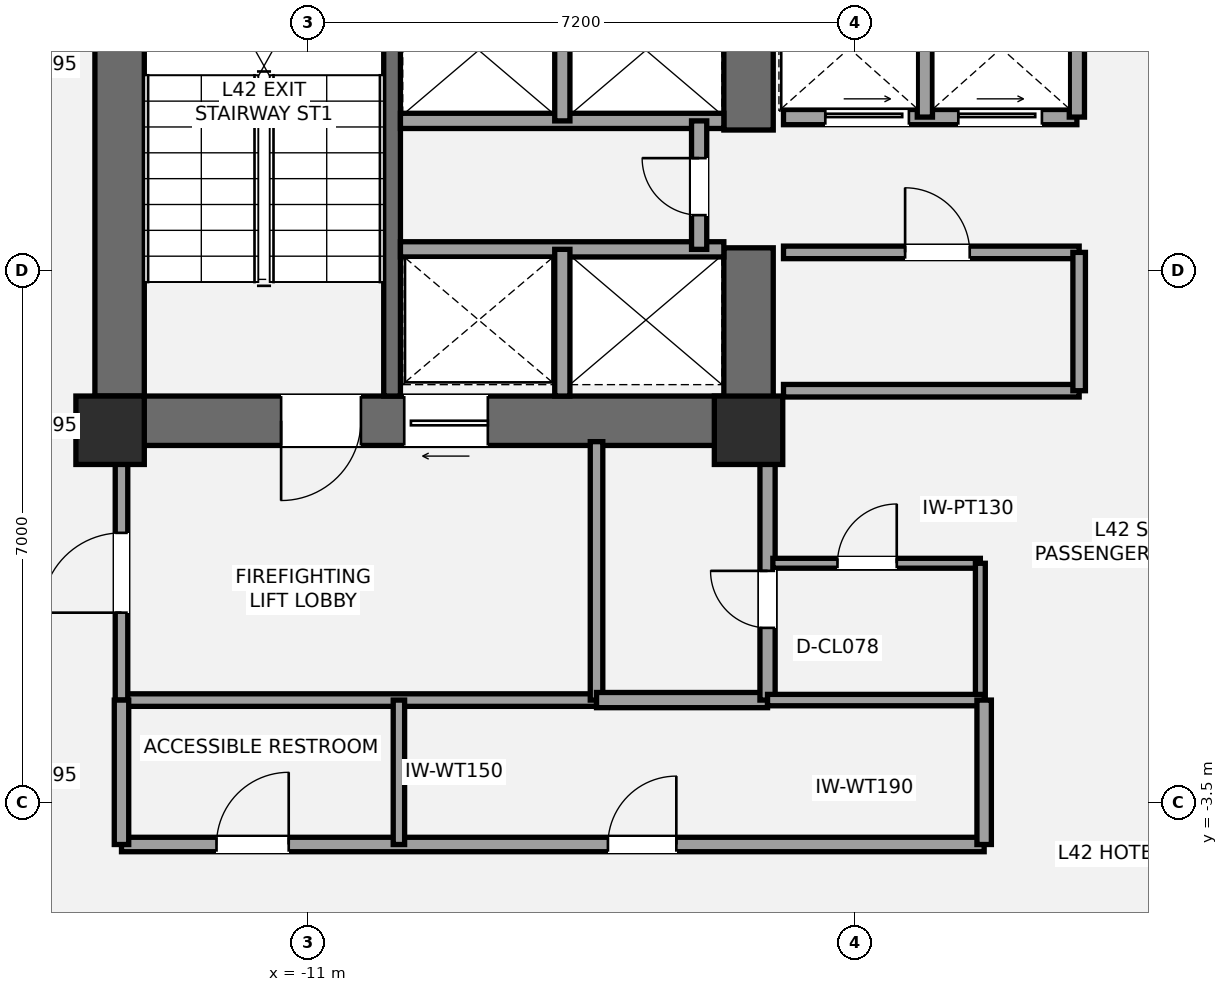
"""IFC4 building model, lengths in metres.
Left out: names, types, materials, properties, quantities, classifications, styles, units other than length and angle.
Written with IfcOpenShell. Run it as: python <this file> out.ifc"""

import sys

from ifc_helpers import new_model, si_unit, direction, frame, frame_2d, origin, origin_2d, place, context, subcontext, project, spatial, rectangle, extrude, element, fill, save


model = new_model("IFC4")
c1 = context("Model", 3, precision=1e-05, world=origin(), true_north=direction((0.0, 1.0)))
c2 = subcontext(c1, "Body", "Model", "MODEL_VIEW")
j1 = project(units=[si_unit("LENGTHUNIT", "METRE"), si_unit("PLANEANGLEUNIT", "RADIAN")], contexts=[c1])
p1 = place(None, origin())
s1 = spatial("IfcSite", under=j1, at=p1, CompositionType="ELEMENT")
p2 = place(p1, origin())
s2 = spatial("IfcBuilding", under=s1, at=p2, CompositionType="ELEMENT")
p3 = place(p2, frame((0.0, 0.0, 156.6)))
s3 = spatial("IfcBuildingStorey", under=s2, at=p3, CompositionType="ELEMENT", Elevation=156.6)
p4 = place(p3, frame((-13.475, 1.2, 0.0), z_axis=(0.0, 0.0, 1.0), x_axis=(0.0, 1.0, 0.0)))
e1 = element("IfcWall", 1, at=p4, inside=s3, PredefinedType="SHEAR", context=c2, shape_type="SweptSolid", body=[
    extrude(rectangle(XDim=8.45, YDim=0.65, at=frame_2d((4.225, 0.0))), origin(), (0.0, 0.0, 1.0), 3.2),
])
p5 = place(p3, frame((-4.875, 1.525, 0.0), z_axis=(0.0, 0.0, 1.0), x_axis=(-1.0, 0.0, 0.0)))
e2 = element("IfcWall", 2, at=p5, inside=s3, PredefinedType="SHEAR", context=c2, shape_type="SweptSolid", body=[
    extrude(rectangle(XDim=8.925, YDim=0.65, at=frame_2d((4.462, 0.0))), origin(), (0.0, 0.0, 1.0), 3.2),
])
p6 = place(p5, frame((5.425, 0.0, 0.0)))
e3 = element("IfcOpeningElement", 3, at=p6, cuts=e2, PredefinedType="OPENING", context=c2, shape_type="SweptSolid", body=[
    extrude(rectangle(XDim=1.05, YDim=2.15, at=frame_2d((0.525, 1.075))), frame((0.0, 0.335, 0.0), z_axis=(0.0, -1.0, 0.0), x_axis=(1.0, 0.0, 0.0)), (0.0, 0.0, 1.0), 0.67),
])
p7 = place(p5, frame((3.755, 0.0, 0.0)))
e4 = element("IfcOpeningElement", 4, at=p7, cuts=e2, PredefinedType="OPENING", context=c2, shape_type="SweptSolid", body=[
    extrude(rectangle(XDim=1.1, YDim=2.2, at=frame_2d((0.55, 1.1))), frame((0.0, 0.335, 0.0), z_axis=(0.0, -1.0, 0.0), x_axis=(1.0, 0.0, 0.0)), (0.0, 0.0, 1.0), 0.67),
])
p8 = place(p3, frame((-5.2, 1.2, 0.0), z_axis=(0.0, 0.0, 1.0), x_axis=(0.0, 1.0, 0.0)))
e5 = element("IfcWall", 5, at=p8, inside=s3, PredefinedType="SHEAR", context=c2, shape_type="SweptSolid", body=[
    extrude(rectangle(XDim=2.6, YDim=0.65, at=frame_2d((1.3, 0.0))), origin(), (0.0, 0.0, 1.0), 3.2),
])
p9 = place(p3, frame((-5.2, 5.35, 0.0), z_axis=(0.0, 0.0, 1.0), x_axis=(0.0, 1.0, 0.0)))
e6 = element("IfcWall", 6, at=p9, inside=s3, PredefinedType="SHEAR", context=c2, shape_type="SweptSolid", body=[
    extrude(rectangle(XDim=2.0, YDim=0.65, at=frame_2d((1.0, 0.0))), origin(), (0.0, 0.0, 1.0), 3.2),
])
p10 = place(p3, frame((-9.89, 1.85, 0.0), z_axis=(0.0, 0.0, 1.0), x_axis=(0.0, 1.0, 0.0)))
e7 = element("IfcWall", 7, at=p10, inside=s3, PredefinedType="SHEAR", context=c2, shape_type="SweptSolid", body=[
    extrude(rectangle(XDim=7.15, YDim=0.22, at=frame_2d((3.575, 0.0))), origin(), (0.0, 0.0, 1.0), 3.2),
])
for number, where, z_axis, x_axis in (
    (8, (-13.6, 1.4, 0.0), (0.0, 0.0, 1.0), (1.0, 0.0, 0.0)),
    (9, (-5.2, 1.4, 0.0), (0.0, 0.0, 1.0), (1.0, 0.0, 0.0)),
):
    element("IfcColumn", number, at=place(p3, frame(where, z_axis=z_axis, x_axis=x_axis)), inside=s3, PredefinedType="COLUMN", context=c2, shape_type="SweptSolid", body=[
        extrude(rectangle(XDim=0.9, YDim=0.9, at=origin_2d()), origin(), (0.0, 0.0, 1.0), 3.2),
    ])
p11 = place(p3, frame((-13.45, -2.15, 0.0), z_axis=(0.0, 0.0, 1.0), x_axis=(1.0, 0.0, 0.0)))
e10 = element("IfcWall", 10, at=p11, inside=s3, PredefinedType="PARTITIONING", context=c2, shape_type="SweptSolid", body=[
    extrude(rectangle(XDim=6.25, YDim=0.165, at=frame_2d((3.125, 0.0))), origin(), (0.0, 0.0, 1.0), 3.02),
])
p12 = place(p3, frame((-13.45, -2.15, 0.0), z_axis=(0.0, 0.0, 1.0), x_axis=(0.0, 1.0, 0.0)))
e11 = element("IfcWall", 11, at=p12, inside=s3, PredefinedType="PARTITIONING", context=c2, shape_type="SweptSolid", body=[
    extrude(rectangle(XDim=3.4, YDim=0.165, at=frame_2d((1.7, 0.0))), origin(), (0.0, 0.0, 1.0), 2.473),
])
p13 = place(p12, frame((1.15, 0.0, 0.0)))
e12 = element("IfcOpeningElement", 12, at=p13, cuts=e11, PredefinedType="OPENING", context=c2, shape_type="SweptSolid", body=[
    extrude(rectangle(XDim=1.05, YDim=2.15, at=frame_2d((0.525, 1.075))), frame((0.0, 0.093, 0.0), z_axis=(0.0, -1.0, 0.0), x_axis=(1.0, 0.0, 0.0)), (0.0, 0.0, 1.0), 0.185),
])
p14 = place(p3, frame((-7.2, -2.15, 0.0), z_axis=(0.0, 0.0, 1.0), x_axis=(0.0, 1.0, 0.0)))
e13 = element("IfcWall", 13, at=p14, inside=s3, PredefinedType="PARTITIONING", context=c2, shape_type="SweptSolid", body=[
    extrude(rectangle(XDim=3.4, YDim=0.165, at=frame_2d((1.7, 0.0))), origin(), (0.0, 0.0, 1.0), 2.473),
])
p15 = place(p3, frame((-7.2, -2.15, 0.0), z_axis=(0.0, 0.0, 1.0), x_axis=(1.0, 0.0, 0.0)))
e14 = element("IfcWall", 14, at=p15, inside=s3, PredefinedType="SOLIDWALL", context=c2, shape_type="SweptSolid", body=[
    extrude(rectangle(XDim=2.25, YDim=0.2, at=frame_2d((1.125, 0.0))), origin(), (0.0, 0.0, 1.0), 3.02),
])
p16 = place(p3, frame((-4.95, -2.15, 0.0), z_axis=(0.0, 0.0, 1.0), x_axis=(0.0, 1.0, 0.0)))
e15 = element("IfcWall", 15, at=p16, inside=s3, PredefinedType="SOLIDWALL", context=c2, shape_type="SweptSolid", body=[
    extrude(rectangle(XDim=3.4, YDim=0.2, at=frame_2d((1.7, 0.0))), origin(), (0.0, 0.0, 1.0), 2.473),
])
p17 = place(p16, frame((0.95, 0.0, 0.0)))
e16 = element("IfcOpeningElement", 16, at=p17, cuts=e15, PredefinedType="OPENING", context=c2, shape_type="SweptSolid", body=[
    extrude(rectangle(XDim=0.75, YDim=2.1, at=frame_2d((0.375, 1.05))), frame((0.0, 0.11, 0.0), z_axis=(0.0, -1.0, 0.0), x_axis=(1.0, 0.0, 0.0)), (0.0, 0.0, 1.0), 0.22),
])
p18 = place(p3, frame((-4.88, -0.35, 0.0), z_axis=(0.0, 0.0, 1.0), x_axis=(1.0, 0.0, 0.0)))
e17 = element("IfcWall", 17, at=p18, inside=s3, PredefinedType="PARTITIONING", context=c2, shape_type="SweptSolid", body=[
    extrude(rectangle(XDim=2.73, YDim=0.13, at=frame_2d((1.365, 0.0))), origin(), (0.0, 0.0, 1.0), 2.473),
])
p19 = place(p18, frame((0.85, 0.0, 0.0)))
e18 = element("IfcOpeningElement", 18, at=p19, cuts=e17, PredefinedType="OPENING", context=c2, shape_type="SweptSolid", body=[
    extrude(rectangle(XDim=0.78, YDim=2.1, at=frame_2d((0.39, 1.05))), frame((0.0, 0.075, 0.0), z_axis=(0.0, -1.0, 0.0), x_axis=(1.0, 0.0, 0.0)), (0.0, 0.0, 1.0), 0.15),
])
p20 = place(p3, frame((-2.15, -2.15, 0.0), z_axis=(0.0, 0.0, 1.0), x_axis=(0.0, 1.0, 0.0)))
e19 = element("IfcWall", 19, at=p20, inside=s3, PredefinedType="PARTITIONING", context=c2, shape_type="SweptSolid", body=[
    extrude(rectangle(XDim=1.8, YDim=0.13, at=frame_2d((0.9, 0.0))), origin(), (0.0, 0.0, 1.0), 3.02),
])
p21 = place(p3, frame((-9.78, 3.78, 0.0), z_axis=(0.0, 0.0, 1.0), x_axis=(1.0, 0.0, 0.0)))
e20 = element("IfcWall", 20, at=p21, inside=s3, PredefinedType="SOLIDWALL", context=c2, shape_type="SweptSolid", body=[
    extrude(rectangle(XDim=4.255, YDim=0.2, at=frame_2d((2.127, 0.0))), origin(), (0.0, 0.0, 1.0), 3.02),
])
p22 = place(p3, frame((-7.65, 1.85, 0.0), z_axis=(0.0, 0.0, 1.0), x_axis=(0.0, 1.0, 0.0)))
e21 = element("IfcWall", 21, at=p22, inside=s3, PredefinedType="SOLIDWALL", context=c2, shape_type="SweptSolid", body=[
    extrude(rectangle(XDim=1.93, YDim=0.2, at=frame_2d((0.965, 0.0))), origin(), (0.0, 0.0, 1.0), 3.02),
])
p23 = place(p3, frame((-9.78, 5.47, 0.0), z_axis=(0.0, 0.0, 1.0), x_axis=(1.0, 0.0, 0.0)))
e22 = element("IfcWall", 22, at=p23, inside=s3, PredefinedType="SOLIDWALL", context=c2, shape_type="SweptSolid", body=[
    extrude(rectangle(XDim=4.255, YDim=0.2, at=frame_2d((2.127, 0.0))), origin(), (0.0, 0.0, 1.0), 3.02),
])
p24 = place(p3, frame((-7.65, 5.47, 0.0), z_axis=(0.0, 0.0, 1.0), x_axis=(0.0, 1.0, 0.0)))
e23 = element("IfcWall", 23, at=p24, inside=s3, PredefinedType="SOLIDWALL", context=c2, shape_type="SweptSolid", body=[
    extrude(rectangle(XDim=1.86, YDim=0.2, at=frame_2d((0.93, 0.0))), origin(), (0.0, 0.0, 1.0), 3.02),
])
p25 = place(p3, frame((-5.85, 3.78, 0.0), z_axis=(0.0, 0.0, 1.0), x_axis=(0.0, 1.0, 0.0)))
e24 = element("IfcWall", 24, at=p25, inside=s3, PredefinedType="SOLIDWALL", context=c2, shape_type="SweptSolid", body=[
    extrude(rectangle(XDim=1.69, YDim=0.2, at=frame_2d((0.845, 0.0))), origin(), (0.0, 0.0, 1.0), 3.02),
])
p26 = place(p25, frame((0.45, 0.0, 0.0)))
e25 = element("IfcOpeningElement", 25, at=p26, cuts=e24, PredefinedType="OPENING", context=c2, shape_type="SweptSolid", body=[
    extrude(rectangle(XDim=0.75, YDim=2.1, at=frame_2d((0.375, 1.05))), frame((0.0, 0.11, 0.0), z_axis=(0.0, -1.0, 0.0), x_axis=(1.0, 0.0, 0.0)), (0.0, 0.0, 1.0), 0.22),
])
p27 = place(p3, frame((-4.74, 1.92, 0.0), z_axis=(0.0, 0.0, 1.0), x_axis=(1.0, 0.0, 0.0)))
e26 = element("IfcWall", 26, at=p27, inside=s3, PredefinedType="PARTITIONING", context=c2, shape_type="SweptSolid", body=[
    extrude(rectangle(XDim=3.89, YDim=0.165, at=frame_2d((1.945, 0.0))), origin(), (0.0, 0.0, 1.0), 2.16),
])
p28 = place(p3, frame((-4.74, 3.74, 0.0), z_axis=(0.0, 0.0, 1.0), x_axis=(1.0, 0.0, 0.0)))
e27 = element("IfcWall", 27, at=p28, inside=s3, PredefinedType="PARTITIONING", context=c2, shape_type="SweptSolid", body=[
    extrude(rectangle(XDim=3.89, YDim=0.165, at=frame_2d((1.945, 0.0))), origin(), (0.0, 0.0, 1.0), 3.02),
])
p29 = place(p28, frame((1.6, 0.0, 0.0)))
e28 = element("IfcOpeningElement", 28, at=p29, cuts=e27, PredefinedType="OPENING", context=c2, shape_type="SweptSolid", body=[
    extrude(rectangle(XDim=0.85, YDim=2.1, at=frame_2d((0.425, 1.05))), frame((0.0, 0.093, 0.0), z_axis=(0.0, -1.0, 0.0), x_axis=(1.0, 0.0, 0.0)), (0.0, 0.0, 1.0), 0.185),
])
p30 = place(p3, frame((-0.85, 1.92, 0.0), z_axis=(0.0, 0.0, 1.0), x_axis=(0.0, 1.0, 0.0)))
e29 = element("IfcWall", 29, at=p30, inside=s3, PredefinedType="PARTITIONING", context=c2, shape_type="SweptSolid", body=[
    extrude(rectangle(XDim=1.82, YDim=0.165, at=frame_2d((0.91, 0.0))), origin(), (0.0, 0.0, 1.0), 3.02),
])
p31 = place(p3, frame((-4.74, 5.52, 0.0), z_axis=(0.0, 0.0, 1.0), x_axis=(1.0, 0.0, 0.0)))
e30 = element("IfcWall", 30, at=p31, inside=s3, PredefinedType="SOLIDWALL", context=c2, shape_type="SweptSolid", body=[
    extrude(rectangle(XDim=3.86, YDim=0.2, at=frame_2d((1.93, 0.0))), origin(), (0.0, 0.0, 1.0), 3.02),
])
p32 = place(p31, frame((0.55, 0.0, 0.0)))
e31 = element("IfcOpeningElement", 31, at=p32, cuts=e30, PredefinedType="OPENING", context=c2, shape_type="SweptSolid", body=[
    extrude(rectangle(XDim=1.1, YDim=2.2, at=frame_2d((0.55, 1.1))), frame((0.0, 0.11, 0.0), z_axis=(0.0, -1.0, 0.0), x_axis=(1.0, 0.0, 0.0)), (0.0, 0.0, 1.0), 0.22),
])
p33 = place(p31, frame((2.3, 0.0, 0.0)))
e32 = element("IfcOpeningElement", 32, at=p33, cuts=e30, PredefinedType="OPENING", context=c2, shape_type="SweptSolid", body=[
    extrude(rectangle(XDim=1.1, YDim=2.2, at=frame_2d((0.55, 1.1))), frame((0.0, 0.11, 0.0), z_axis=(0.0, -1.0, 0.0), x_axis=(1.0, 0.0, 0.0)), (0.0, 0.0, 1.0), 0.22),
])
for number, where, z_axis, x_axis in (
    (33, (-2.88, 5.52, 0.0), (0.0, 0.0, 1.0), (0.0, 1.0, 0.0)),
    (34, (-0.88, 5.52, 0.0), (0.0, 0.0, 1.0), (0.0, 1.0, 0.0)),
):
    element("IfcWall", number, at=place(p3, frame(where, z_axis=z_axis, x_axis=x_axis)), inside=s3, PredefinedType="SOLIDWALL", context=c2, shape_type="SweptSolid", body=[
        extrude(rectangle(XDim=1.81, YDim=0.2, at=frame_2d((0.905, 0.0))), origin(), (0.0, 0.0, 1.0), 3.02),
    ])
p34 = place(p3, frame((-13.45, -4.05, 0.0), z_axis=(0.0, 0.0, 1.0), x_axis=(1.0, 0.0, 0.0)))
e35 = element("IfcWall", 35, at=p34, inside=s3, PredefinedType="PLUMBINGWALL", context=c2, shape_type="SweptSolid", body=[
    extrude(rectangle(XDim=11.35, YDim=0.19, at=frame_2d((5.675, 0.0))), origin(), (0.0, 0.0, 1.0), 2.555),
])
p35 = place(p34, frame((1.25, 0.0, 0.0)))
e36 = element("IfcOpeningElement", 36, at=p35, cuts=e35, PredefinedType="OPENING", context=c2, shape_type="SweptSolid", body=[
    extrude(rectangle(XDim=0.95, YDim=2.15, at=frame_2d((0.475, 1.075))), frame((0.0, 0.105, 0.0), z_axis=(0.0, -1.0, 0.0), x_axis=(1.0, 0.0, 0.0)), (0.0, 0.0, 1.0), 0.21),
])
p36 = place(p34, frame((6.4, 0.0, 0.0)))
e37 = element("IfcOpeningElement", 37, at=p36, cuts=e35, PredefinedType="OPENING", context=c2, shape_type="SweptSolid", body=[
    extrude(rectangle(XDim=0.9, YDim=2.1, at=frame_2d((0.45, 1.05))), frame((0.0, 0.105, 0.0), z_axis=(0.0, -1.0, 0.0), x_axis=(1.0, 0.0, 0.0)), (0.0, 0.0, 1.0), 0.21),
])
p37 = place(p3, frame((-4.95, -2.15, 0.0), z_axis=(0.0, 0.0, 1.0), x_axis=(1.0, 0.0, 0.0)))
e38 = element("IfcWall", 38, at=p37, inside=s3, PredefinedType="PLUMBINGWALL", context=c2, shape_type="SweptSolid", body=[
    extrude(rectangle(XDim=2.85, YDim=0.15, at=frame_2d((1.425, 0.0))), origin(), (0.0, 0.0, 1.0), 2.473),
])
p38 = place(p3, frame((-13.45, -4.05, 0.0), z_axis=(0.0, 0.0, 1.0), x_axis=(0.0, 1.0, 0.0)))
e39 = element("IfcWall", 39, at=p38, inside=s3, PredefinedType="PLUMBINGWALL", context=c2, shape_type="SweptSolid", body=[
    extrude(rectangle(XDim=1.9, YDim=0.19, at=frame_2d((0.95, 0.0))), origin(), (0.0, 0.0, 1.0), 3.02),
])
p39 = place(p3, frame((-2.1, -4.05, 0.0), z_axis=(0.0, 0.0, 1.0), x_axis=(0.0, 1.0, 0.0)))
e40 = element("IfcWall", 40, at=p39, inside=s3, PredefinedType="PLUMBINGWALL", context=c2, shape_type="SweptSolid", body=[
    extrude(rectangle(XDim=1.9, YDim=0.19, at=frame_2d((0.95, 0.0))), origin(), (0.0, 0.0, 1.0), 2.473),
])
p40 = place(p3, frame((-9.8, -4.05, 0.0), z_axis=(0.0, 0.0, 1.0), x_axis=(0.0, 1.0, 0.0)))
e41 = element("IfcWall", 41, at=p40, inside=s3, PredefinedType="PLUMBINGWALL", context=c2, shape_type="SweptSolid", body=[
    extrude(rectangle(XDim=1.9, YDim=0.15, at=frame_2d((0.95, 0.0))), origin(), (0.0, 0.0, 1.0), 3.02),
])
p41 = place(p6, origin())
e42 = element("IfcDoor", 42, at=p41, inside=s3, OperationType="SINGLE_SWING_RIGHT", PredefinedType="DOOR", context=c2, shape_type="SweptSolid", body=[
    extrude(rectangle(XDim=1.05, YDim=2.15, at=frame_2d((0.525, 1.075))), frame((0.0, 0.025, 0.0), z_axis=(0.0, -1.0, 0.0), x_axis=(1.0, 0.0, 0.0)), (0.0, 0.0, 1.0), 0.05),
])
fill(e3, e42)
p42 = place(p13, origin())
e43 = element("IfcDoor", 43, at=p42, inside=s3, OperationType="SINGLE_SWING_LEFT", PredefinedType="DOOR", context=c2, shape_type="SweptSolid", body=[
    extrude(rectangle(XDim=1.05, YDim=2.15, at=frame_2d((0.525, 1.075))), frame((0.0, 0.025, 0.0), z_axis=(0.0, -1.0, 0.0), x_axis=(1.0, 0.0, 0.0)), (0.0, 0.0, 1.0), 0.05),
])
fill(e12, e43)
p43 = place(p17, origin())
e44 = element("IfcDoor", 44, at=p43, inside=s3, OperationType="SINGLE_SWING_RIGHT", PredefinedType="DOOR", context=c2, shape_type="SweptSolid", body=[
    extrude(rectangle(XDim=0.75, YDim=2.1, at=frame_2d((0.375, 1.05))), frame((0.0, 0.025, 0.0), z_axis=(0.0, -1.0, 0.0), x_axis=(1.0, 0.0, 0.0)), (0.0, 0.0, 1.0), 0.05),
])
fill(e16, e44)
p44 = place(p19, origin())
e45 = element("IfcDoor", 45, at=p44, inside=s3, OperationType="SINGLE_SWING_RIGHT", PredefinedType="DOOR", context=c2, shape_type="SweptSolid", body=[
    extrude(rectangle(XDim=0.78, YDim=2.1, at=frame_2d((0.39, 1.05))), frame((0.0, 0.025, 0.0), z_axis=(0.0, -1.0, 0.0), x_axis=(1.0, 0.0, 0.0)), (0.0, 0.0, 1.0), 0.05),
])
fill(e18, e45)
p45 = place(p7, origin())
e46 = element("IfcDoor", 46, at=p45, inside=s3, OperationType="SLIDING_TO_LEFT", PredefinedType="DOOR", context=c2, shape_type="SweptSolid", body=[
    extrude(rectangle(XDim=1.1, YDim=2.2, at=frame_2d((0.55, 1.1))), frame((0.0, 0.025, 0.0), z_axis=(0.0, -1.0, 0.0), x_axis=(1.0, 0.0, 0.0)), (0.0, 0.0, 1.0), 0.05),
])
fill(e4, e46)
p46 = place(p26, origin())
e47 = element("IfcDoor", 47, at=p46, inside=s3, OperationType="SINGLE_SWING_RIGHT", PredefinedType="DOOR", context=c2, shape_type="SweptSolid", body=[
    extrude(rectangle(XDim=0.75, YDim=2.1, at=frame_2d((0.375, 1.05))), frame((0.0, 0.025, 0.0), z_axis=(0.0, -1.0, 0.0), x_axis=(1.0, 0.0, 0.0)), (0.0, 0.0, 1.0), 0.05),
])
fill(e25, e47)
p47 = place(p29, origin())
e48 = element("IfcDoor", 48, at=p47, inside=s3, OperationType="SINGLE_SWING_LEFT", PredefinedType="DOOR", context=c2, shape_type="SweptSolid", body=[
    extrude(rectangle(XDim=0.85, YDim=2.1, at=frame_2d((0.425, 1.05))), frame((0.0, 0.025, 0.0), z_axis=(0.0, -1.0, 0.0), x_axis=(1.0, 0.0, 0.0)), (0.0, 0.0, 1.0), 0.05),
])
fill(e28, e48)
p48 = place(p32, origin())
e49 = element("IfcDoor", 49, at=p48, inside=s3, OperationType="SLIDING_TO_LEFT", PredefinedType="DOOR", context=c2, shape_type="SweptSolid", body=[
    extrude(rectangle(XDim=1.1, YDim=2.2, at=frame_2d((0.55, 1.1))), frame((0.0, 0.025, 0.0), z_axis=(0.0, -1.0, 0.0), x_axis=(1.0, 0.0, 0.0)), (0.0, 0.0, 1.0), 0.05),
])
fill(e31, e49)
p49 = place(p33, origin())
e50 = element("IfcDoor", 50, at=p49, inside=s3, OperationType="SLIDING_TO_LEFT", PredefinedType="DOOR", context=c2, shape_type="SweptSolid", body=[
    extrude(rectangle(XDim=1.1, YDim=2.2, at=frame_2d((0.55, 1.1))), frame((0.0, 0.025, 0.0), z_axis=(0.0, -1.0, 0.0), x_axis=(1.0, 0.0, 0.0)), (0.0, 0.0, 1.0), 0.05),
])
fill(e32, e50)
p50 = place(p35, origin())
e51 = element("IfcDoor", 51, at=p50, inside=s3, OperationType="SINGLE_SWING_RIGHT", PredefinedType="DOOR", context=c2, shape_type="SweptSolid", body=[
    extrude(rectangle(XDim=0.95, YDim=2.15, at=frame_2d((0.475, 1.075))), frame((0.0, 0.025, 0.0), z_axis=(0.0, -1.0, 0.0), x_axis=(1.0, 0.0, 0.0)), (0.0, 0.0, 1.0), 0.05),
])
fill(e36, e51)
p51 = place(p36, origin())
e52 = element("IfcDoor", 52, at=p51, inside=s3, OperationType="SINGLE_SWING_RIGHT", PredefinedType="DOOR", context=c2, shape_type="SweptSolid", body=[
    extrude(rectangle(XDim=0.9, YDim=2.1, at=frame_2d((0.45, 1.05))), frame((0.0, 0.025, 0.0), z_axis=(0.0, -1.0, 0.0), x_axis=(1.0, 0.0, 0.0)), (0.0, 0.0, 1.0), 0.05),
])
fill(e37, e52)
save(model, sys.argv[1])
